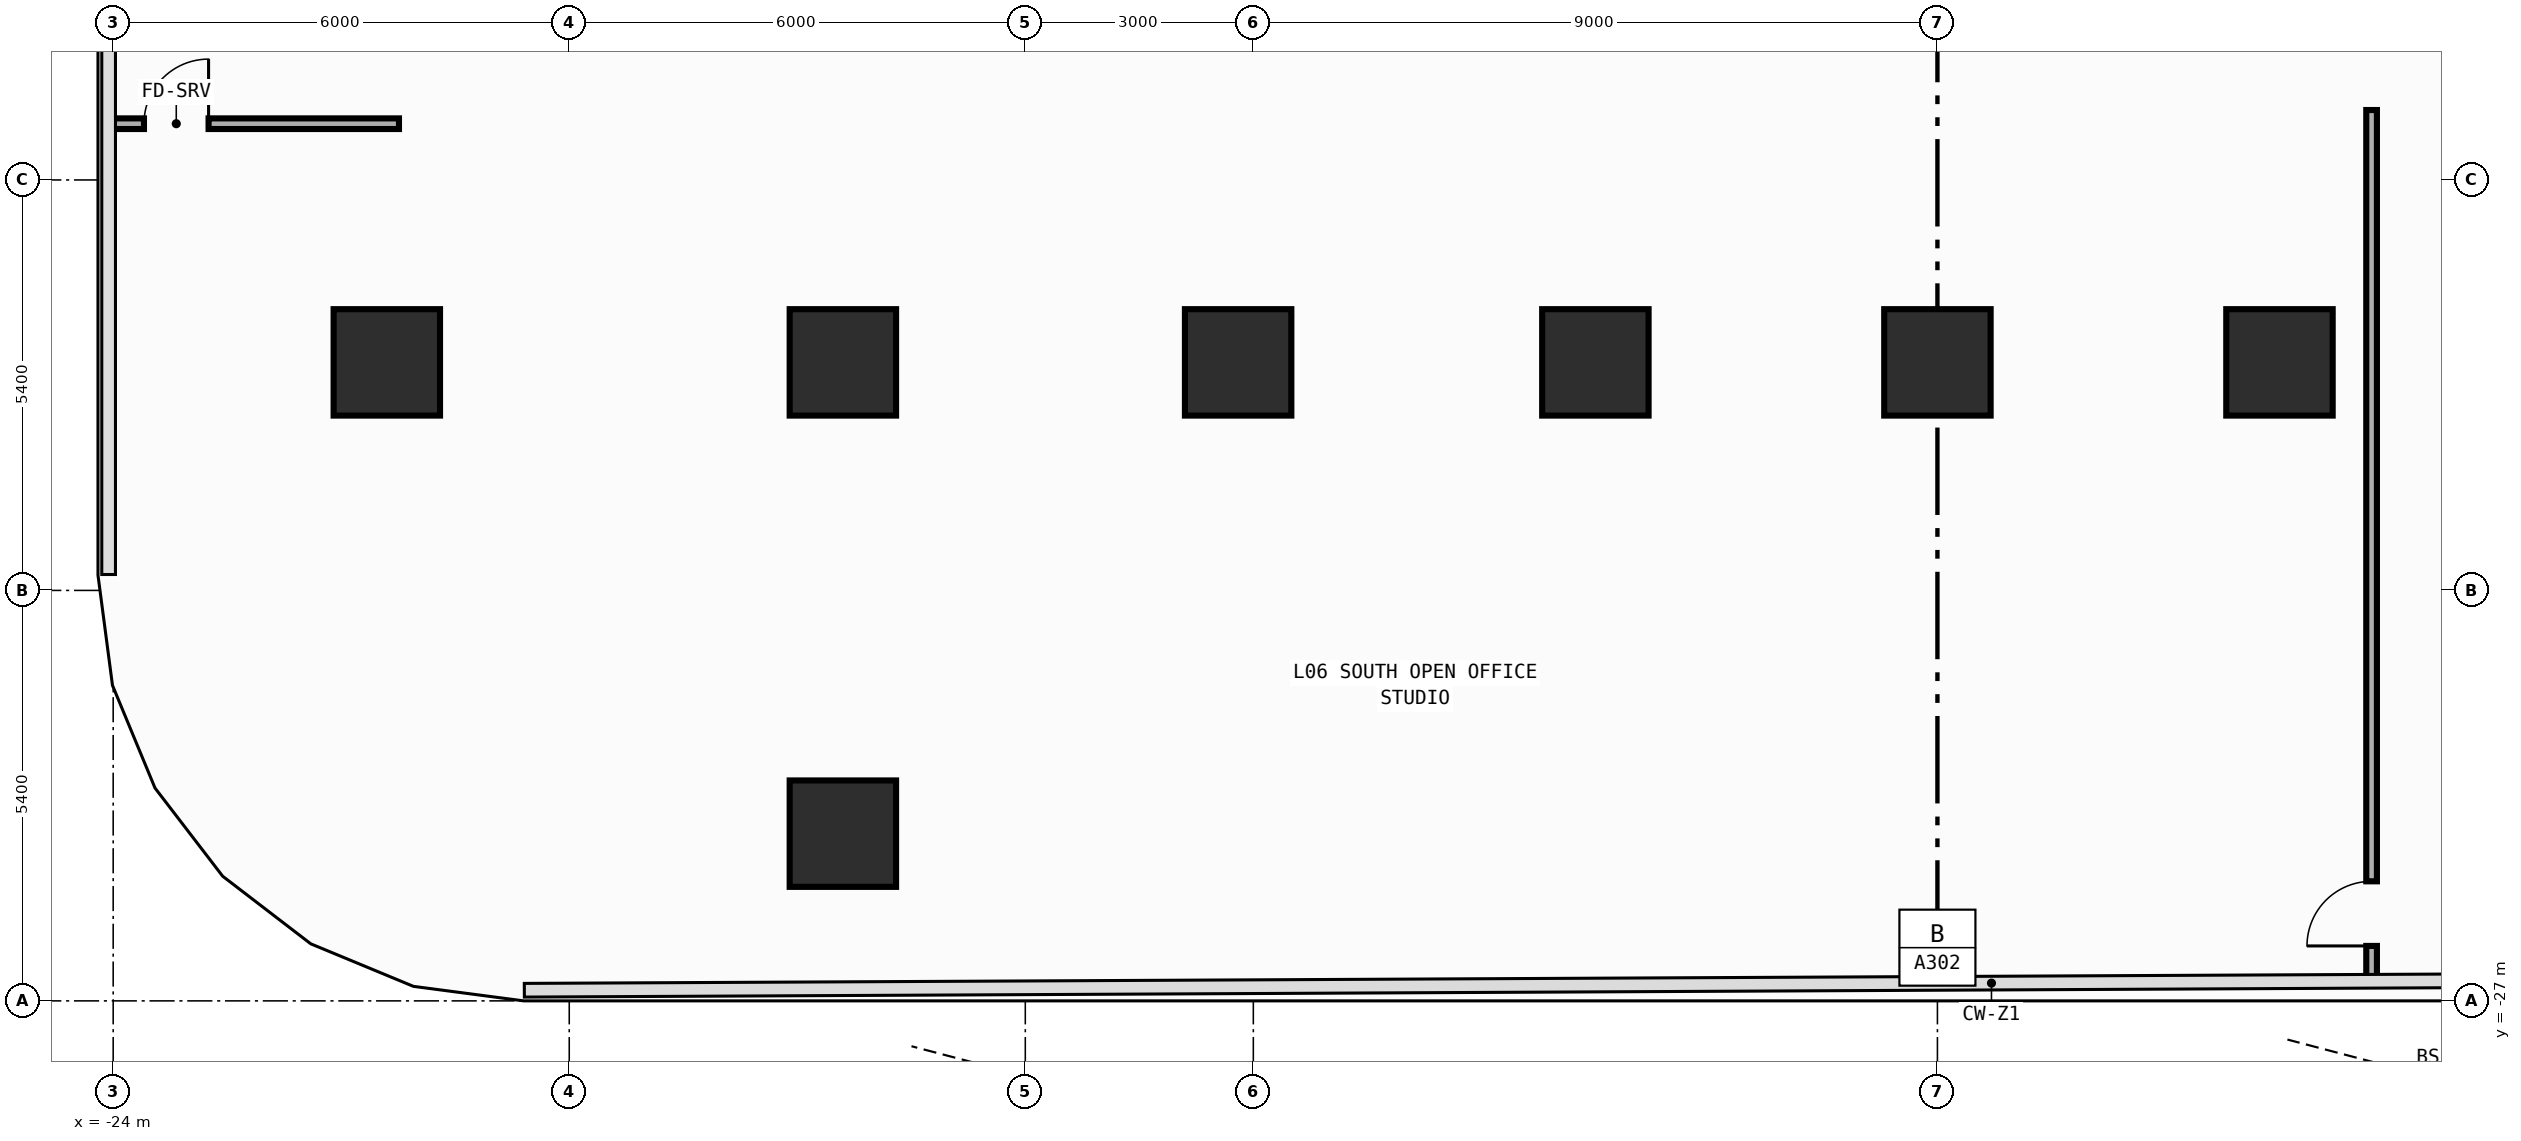
"""IFC4 building model, lengths in metres.
Left out: names, types, materials, properties, quantities, classifications, styles, units other than length and angle.
Written with IfcOpenShell. Run it as: python <this file> out.ifc"""

import sys

from ifc_helpers import new_model, si_unit, direction, frame, frame_2d, origin, origin_2d, place, context, subcontext, project, spatial, rectangle, extrude, element, fill, save


model = new_model("IFC4")
c1 = context("Model", 3, precision=1e-05, world=origin(), true_north=direction((0.0, 1.0)))
c2 = subcontext(c1, "Body", "Model", "MODEL_VIEW")
j1 = project(units=[si_unit("LENGTHUNIT", "METRE"), si_unit("PLANEANGLEUNIT", "RADIAN")], contexts=[c1])
p1 = place(None, origin())
s1 = spatial("IfcSite", under=j1, at=p1, CompositionType="ELEMENT")
p2 = place(p1, origin())
s2 = spatial("IfcBuilding", under=s1, at=p2, CompositionType="ELEMENT")
p3 = place(p2, frame((0.0, 0.0, 26.0)))
s3 = spatial("IfcBuildingStorey", under=s2, at=p3, CompositionType="ELEMENT", Elevation=26.0)
for number, where, z_axis, x_axis in (
    (1, (-9.2, -18.6, 0.0), (0.0, 0.0, 1.0), (1.0, 0.0, 0.0)),
    (2, (-20.4, -18.6, 0.0), (0.0, 0.0, 1.0), (1.0, 0.0, 0.0)),
    (3, (-14.4, -18.6, 0.0), (0.0, 0.0, 1.0), (1.0, 0.0, 0.0)),
    (4, (-4.5, -18.6, 0.0), (0.0, 0.0, 1.0), (1.0, 0.0, 0.0)),
    (5, (0.0, -18.6, 0.0), (0.0, 0.0, 1.0), (1.0, 0.0, 0.0)),
    (6, (4.5, -18.6, 0.0), (0.0, 0.0, 1.0), (1.0, 0.0, 0.0)),
    (7, (-14.4, -24.8, 0.0), (0.0, 0.0, 1.0), (1.0, 0.0, 0.0)),
):
    element("IfcColumn", number, at=place(p3, frame(where, z_axis=z_axis, x_axis=x_axis)), inside=s3, PredefinedType="COLUMN", context=c2, shape_type="SweptSolid", body=[
        extrude(rectangle(XDim=1.4, YDim=1.4, at=origin_2d()), origin(), (0.0, 0.0, 1.0), 4.2),
    ])
p4 = place(p3, frame((-24.055, -15.46, 0.0), z_axis=(0.0, 0.0, 1.0), x_axis=(1.0, 0.0, 0.0)))
e8 = element("IfcWall", 8, at=p4, inside=s3, PredefinedType="PARTITIONING", context=c2, shape_type="SweptSolid", body=[
    extrude(rectangle(XDim=3.815, YDim=0.14, at=frame_2d((1.907, 0.0))), origin(), (0.0, 0.0, 1.0), 3.94),
])
p5 = place(p4, frame((0.46, 0.0, 0.0)))
e9 = element("IfcOpeningElement", 9, at=p5, cuts=e8, PredefinedType="OPENING", context=c2, shape_type="SweptSolid", body=[
    extrude(rectangle(XDim=0.85, YDim=2.1, at=frame_2d((0.425, 1.05))), frame((0.0, 0.08, 0.0), z_axis=(0.0, -1.0, 0.0), x_axis=(1.0, 0.0, 0.0)), (0.0, 0.0, 1.0), 0.16),
])
p6 = place(p3, frame((5.712, -26.737, 0.0), z_axis=(0.0, 0.0, 1.0), x_axis=(0.0, 1.0, 0.0)))
e10 = element("IfcWall", 10, at=p6, inside=s3, PredefinedType="PARTITIONING", context=c2, shape_type="SweptSolid", body=[
    extrude(rectangle(XDim=11.457, YDim=0.14, at=frame_2d((5.729, 0.0))), origin(), (0.0, 0.0, 1.0), 3.94),
])
p7 = place(p6, frame((0.46, 0.0, 0.0)))
e11 = element("IfcOpeningElement", 11, at=p7, cuts=e10, PredefinedType="OPENING", context=c2, shape_type="SweptSolid", body=[
    extrude(rectangle(XDim=0.85, YDim=2.1, at=frame_2d((0.425, 1.05))), frame((0.0, 0.08, 0.0), z_axis=(0.0, -1.0, 0.0), x_axis=(1.0, 0.0, 0.0)), (0.0, 0.0, 1.0), 0.16),
])
p8 = place(p5, origin())
e12 = element("IfcDoor", 12, at=p8, inside=s3, OperationType="SINGLE_SWING_RIGHT", PredefinedType="DOOR", context=c2, shape_type="SweptSolid", body=[
    extrude(rectangle(XDim=0.85, YDim=2.1, at=frame_2d((0.425, 1.05))), frame((0.0, 0.025, 0.0), z_axis=(0.0, -1.0, 0.0), x_axis=(1.0, 0.0, 0.0)), (0.0, 0.0, 1.0), 0.05),
])
fill(e9, e12)
p9 = place(p7, origin())
e13 = element("IfcDoor", 13, at=p9, inside=s3, OperationType="SINGLE_SWING_LEFT", PredefinedType="DOOR", context=c2, shape_type="SweptSolid", body=[
    extrude(rectangle(XDim=0.85, YDim=2.1, at=frame_2d((0.425, 1.05))), frame((0.0, 0.025, 0.0), z_axis=(0.0, -1.0, 0.0), x_axis=(1.0, 0.0, 0.0)), (0.0, 0.0, 1.0), 0.05),
])
fill(e11, e13)
save(model, sys.argv[1])
